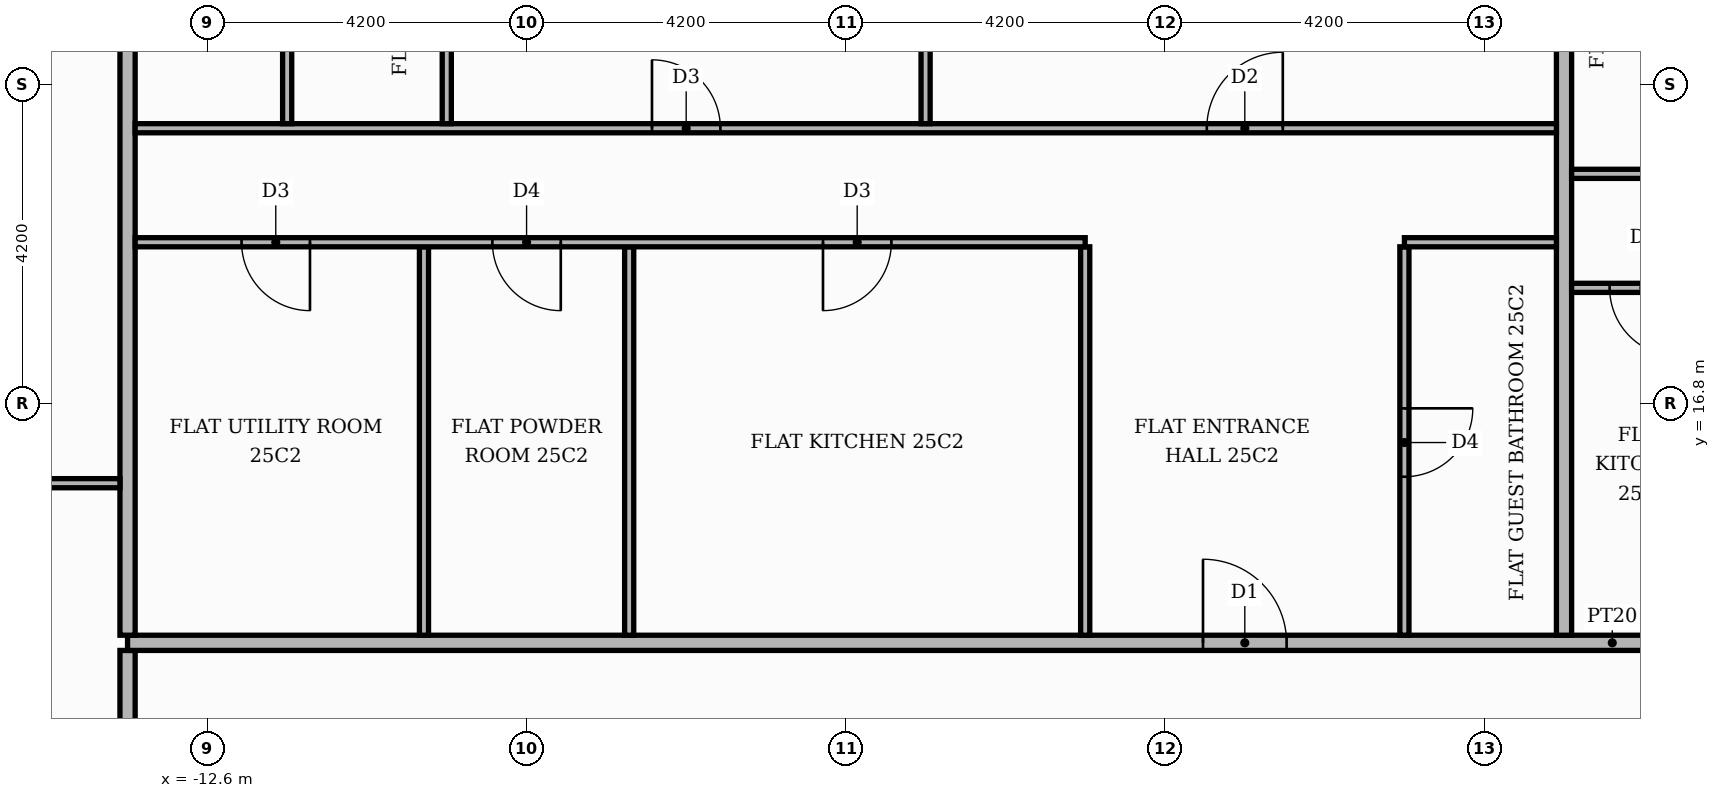
"""IFC4 building model, lengths in metres.
Left out: names, types, materials, properties, quantities, classifications, styles, units other than length and angle.
Written with IfcOpenShell. Run it as: python <this file> out.ifc"""

import sys

from ifc_helpers import new_model, si_unit, direction, frame, frame_2d, origin, place, context, subcontext, project, spatial, rectangle, extrude, element, fill, save


model = new_model("IFC4")
c1 = context("Model", 3, precision=1e-05, world=origin(), true_north=direction((0.0, 1.0)))
c2 = subcontext(c1, "Body", "Model", "MODEL_VIEW")
j1 = project(units=[si_unit("LENGTHUNIT", "METRE"), si_unit("PLANEANGLEUNIT", "RADIAN")], contexts=[c1])
p1 = place(None, origin())
s1 = spatial("IfcSite", under=j1, at=p1, CompositionType="ELEMENT")
p2 = place(p1, origin())
s2 = spatial("IfcBuilding", under=s1, at=p2, CompositionType="ELEMENT")
p3 = place(p2, frame((0.0, 0.0, 106.5)))
s3 = spatial("IfcBuildingStorey", under=s2, at=p3, CompositionType="ELEMENT", Elevation=106.5)
p4 = place(p3, frame((-13.65, -13.55, 0.0), z_axis=(0.0, 0.0, 1.0), x_axis=(0.0, 1.0, 0.0)))
e1 = element("IfcWall", 1, at=p4, inside=s3, PredefinedType="PARTITIONING", context=c2, shape_type="SweptSolid", body=[
    extrude(rectangle(XDim=27.1, YDim=0.2, at=frame_2d((13.55, 0.0))), origin(), (0.0, 0.0, 1.0), 3.48),
])
p5 = place(p4, frame((24.55, 0.0, 0.0)))
e2 = element("IfcOpeningElement", 2, at=p5, cuts=e1, PredefinedType="OPENING", context=c2, shape_type="SweptSolid", body=[
    extrude(rectangle(XDim=1.1, YDim=2.4, at=frame_2d((0.55, 1.2))), frame((0.0, 0.11, 0.0), z_axis=(0.0, -1.0, 0.0), x_axis=(1.0, 0.0, 0.0)), (0.0, 0.0, 1.0), 0.22),
])
p6 = place(p3, frame((-13.65, 13.65, 0.0), z_axis=(0.0, 0.0, 1.0), x_axis=(1.0, 0.0, 0.0)))
e3 = element("IfcWall", 3, at=p6, inside=s3, PredefinedType="PARTITIONING", context=c2, shape_type="SweptSolid", body=[
    extrude(rectangle(XDim=39.07, YDim=0.2, at=frame_2d((19.535, 0.0))), origin(), (0.0, 0.0, 1.0), 3.48),
])
p7 = place(p6, frame((24.65, 0.0, 0.0)))
e4 = element("IfcOpeningElement", 4, at=p7, cuts=e3, PredefinedType="OPENING", context=c2, shape_type="SweptSolid", body=[
    extrude(rectangle(XDim=1.1, YDim=2.4, at=frame_2d((0.55, 1.2))), frame((0.0, 0.11, 0.0), z_axis=(0.0, -1.0, 0.0), x_axis=(1.0, 0.0, 0.0)), (0.0, 0.0, 1.0), 0.22),
])
p8 = place(p6, frame((14.15, 0.0, 0.0)))
e5 = element("IfcOpeningElement", 5, at=p8, cuts=e3, PredefinedType="OPENING", context=c2, shape_type="SweptSolid", body=[
    extrude(rectangle(XDim=1.1, YDim=2.4, at=frame_2d((0.55, 1.2))), frame((0.0, 0.11, 0.0), z_axis=(0.0, -1.0, 0.0), x_axis=(1.0, 0.0, 0.0)), (0.0, 0.0, 1.0), 0.22),
])
p9 = place(p3, frame((-13.65, 13.75, 0.0), z_axis=(0.0, 0.0, 1.0), x_axis=(0.0, 1.0, 0.0)))
e6 = element("IfcWall", 6, at=p9, inside=s3, PredefinedType="PARTITIONING", context=c2, shape_type="SweptSolid", body=[
    extrude(rectangle(XDim=11.67, YDim=0.2, at=frame_2d((5.835, 0.0))), origin(), (0.0, 0.0, 1.0), 3.48),
])
for number, where, z_axis, x_axis in (
    (7, (-9.75, 13.75, 0.0), (0.0, 0.0, 1.0), (0.0, 1.0, 0.0)),
    (8, (-7.05, 13.75, 0.0), (0.0, 0.0, 1.0), (0.0, 1.0, 0.0)),
    (9, (-1.05, 13.75, 0.0), (0.0, 0.0, 1.0), (0.0, 1.0, 0.0)),
):
    element("IfcWall", number, at=place(p3, frame(where, z_axis=z_axis, x_axis=x_axis)), inside=s3, PredefinedType="PARTITIONING", context=c2, shape_type="SweptSolid", body=[
        extrude(rectangle(XDim=5.11, YDim=0.12, at=frame_2d((2.555, 0.0))), origin(), (0.0, 0.0, 1.0), 3.48),
    ])
p10 = place(p3, frame((3.15, 13.75, 0.0), z_axis=(0.0, 0.0, 1.0), x_axis=(0.0, 1.0, 0.0)))
e10 = element("IfcWall", 10, at=p10, inside=s3, PredefinedType="PARTITIONING", context=c2, shape_type="SweptSolid", body=[
    extrude(rectangle(XDim=5.11, YDim=0.12, at=frame_2d((2.555, 0.0))), origin(), (0.0, 0.0, 1.0), 3.48),
])
p11 = place(p10, frame((2.085, 0.0, 0.0)))
e11 = element("IfcOpeningElement", 11, at=p11, cuts=e10, PredefinedType="OPENING", context=c2, shape_type="SweptSolid", body=[
    extrude(rectangle(XDim=0.9, YDim=2.1, at=frame_2d((0.45, 1.05))), frame((0.0, 0.07, 0.0), z_axis=(0.0, -1.0, 0.0), x_axis=(1.0, 0.0, 0.0)), (0.0, 0.0, 1.0), 0.14),
])
p12 = place(p3, frame((5.25, 13.75, 0.0), z_axis=(0.0, 0.0, 1.0), x_axis=(0.0, 1.0, 0.0)))
e12 = element("IfcWall", 12, at=p12, inside=s3, PredefinedType="PARTITIONING", context=c2, shape_type="SweptSolid", body=[
    extrude(rectangle(XDim=11.67, YDim=0.2, at=frame_2d((5.835, 0.0))), origin(), (0.0, 0.0, 1.0), 3.48),
])
p13 = place(p3, frame((-20.72, 15.75, 0.0), z_axis=(0.0, 0.0, 1.0), x_axis=(1.0, 0.0, 0.0)))
e13 = element("IfcWall", 13, at=p13, inside=s3, PredefinedType="PARTITIONING", context=c2, shape_type="SweptSolid", body=[
    extrude(rectangle(XDim=6.97, YDim=0.12, at=frame_2d((3.485, 0.0))), origin(), (0.0, 0.0, 1.0), 3.48),
])
p14 = place(p13, frame((3.085, 0.0, 0.0)))
e14 = element("IfcOpeningElement", 14, at=p14, cuts=e13, PredefinedType="OPENING", context=c2, shape_type="SweptSolid", body=[
    extrude(rectangle(XDim=0.9, YDim=2.1, at=frame_2d((0.45, 1.05))), frame((0.0, 0.07, 0.0), z_axis=(0.0, -1.0, 0.0), x_axis=(1.0, 0.0, 0.0)), (0.0, 0.0, 1.0), 0.14),
])
p15 = place(p3, frame((5.35, 18.32, 0.0), z_axis=(0.0, 0.0, 1.0), x_axis=(1.0, 0.0, 0.0)))
e15 = element("IfcWall", 15, at=p15, inside=s3, PredefinedType="PARTITIONING", context=c2, shape_type="SweptSolid", body=[
    extrude(rectangle(XDim=4.1, YDim=0.12, at=frame_2d((2.05, 0.0))), origin(), (0.0, 0.0, 1.0), 3.48),
])
p16 = place(p15, frame((0.5, 0.0, 0.0)))
e16 = element("IfcOpeningElement", 16, at=p16, cuts=e15, PredefinedType="OPENING", context=c2, shape_type="SweptSolid", body=[
    extrude(rectangle(XDim=0.9, YDim=2.1, at=frame_2d((0.45, 1.05))), frame((0.0, 0.07, 0.0), z_axis=(0.0, -1.0, 0.0), x_axis=(1.0, 0.0, 0.0)), (0.0, 0.0, 1.0), 0.14),
])
p17 = place(p3, frame((-13.55, 18.92, 0.0), z_axis=(0.0, 0.0, 1.0), x_axis=(1.0, 0.0, 0.0)))
e17 = element("IfcWall", 17, at=p17, inside=s3, PredefinedType="PARTITIONING", context=c2, shape_type="SweptSolid", body=[
    extrude(rectangle(XDim=12.5, YDim=0.12, at=frame_2d((6.25, 0.0))), origin(), (0.0, 0.0, 1.0), 3.48),
])
p18 = place(p17, frame((9.05, 0.0, 0.0)))
e18 = element("IfcOpeningElement", 18, at=p18, cuts=e17, PredefinedType="OPENING", context=c2, shape_type="SweptSolid", body=[
    extrude(rectangle(XDim=0.9, YDim=2.1, at=frame_2d((0.45, 1.05))), frame((0.0, 0.07, 0.0), z_axis=(0.0, -1.0, 0.0), x_axis=(1.0, 0.0, 0.0)), (0.0, 0.0, 1.0), 0.14),
])
p19 = place(p17, frame((4.7, 0.0, 0.0)))
e19 = element("IfcOpeningElement", 19, at=p19, cuts=e17, PredefinedType="OPENING", context=c2, shape_type="SweptSolid", body=[
    extrude(rectangle(XDim=0.9, YDim=2.1, at=frame_2d((0.45, 1.05))), frame((0.0, 0.07, 0.0), z_axis=(0.0, -1.0, 0.0), x_axis=(1.0, 0.0, 0.0)), (0.0, 0.0, 1.0), 0.14),
])
p20 = place(p17, frame((1.4, 0.0, 0.0)))
e20 = element("IfcOpeningElement", 20, at=p20, cuts=e17, PredefinedType="OPENING", context=c2, shape_type="SweptSolid", body=[
    extrude(rectangle(XDim=0.9, YDim=2.1, at=frame_2d((0.45, 1.05))), frame((0.0, 0.07, 0.0), z_axis=(0.0, -1.0, 0.0), x_axis=(1.0, 0.0, 0.0)), (0.0, 0.0, 1.0), 0.14),
])
p21 = place(p3, frame((3.15, 18.92, 0.0), z_axis=(0.0, 0.0, 1.0), x_axis=(1.0, 0.0, 0.0)))
e21 = element("IfcWall", 21, at=p21, inside=s3, PredefinedType="PARTITIONING", context=c2, shape_type="SweptSolid", body=[
    extrude(rectangle(XDim=2.0, YDim=0.12, at=frame_2d((1.0, 0.0))), origin(), (0.0, 0.0, 1.0), 3.48),
])
p22 = place(p3, frame((5.35, 19.82, 0.0), z_axis=(0.0, 0.0, 1.0), x_axis=(1.0, 0.0, 0.0)))
e22 = element("IfcWall", 22, at=p22, inside=s3, PredefinedType="PARTITIONING", context=c2, shape_type="SweptSolid", body=[
    extrude(rectangle(XDim=12.05, YDim=0.12, at=frame_2d((6.025, 0.0))), origin(), (0.0, 0.0, 1.0), 3.48),
])
p23 = place(p22, frame((8.85, 0.0, 0.0)))
e23 = element("IfcOpeningElement", 23, at=p23, cuts=e22, PredefinedType="OPENING", context=c2, shape_type="SweptSolid", body=[
    extrude(rectangle(XDim=1.0, YDim=2.1, at=frame_2d((0.5, 1.05))), frame((0.0, 0.07, 0.0), z_axis=(0.0, -1.0, 0.0), x_axis=(1.0, 0.0, 0.0)), (0.0, 0.0, 1.0), 0.14),
])
p24 = place(p22, frame((5.75, 0.0, 0.0)))
e24 = element("IfcOpeningElement", 24, at=p24, cuts=e22, PredefinedType="OPENING", context=c2, shape_type="SweptSolid", body=[
    extrude(rectangle(XDim=0.9, YDim=2.1, at=frame_2d((0.45, 1.05))), frame((0.0, 0.07, 0.0), z_axis=(0.0, -1.0, 0.0), x_axis=(1.0, 0.0, 0.0)), (0.0, 0.0, 1.0), 0.14),
])
p25 = place(p3, frame((-13.55, 20.42, 0.0), z_axis=(0.0, 0.0, 1.0), x_axis=(1.0, 0.0, 0.0)))
e25 = element("IfcWall", 25, at=p25, inside=s3, PredefinedType="PARTITIONING", context=c2, shape_type="SweptSolid", body=[
    extrude(rectangle(XDim=18.7, YDim=0.12, at=frame_2d((9.35, 0.0))), origin(), (0.0, 0.0, 1.0), 3.48),
])
p26 = place(p25, frame((14.1, 0.0, 0.0)))
e26 = element("IfcOpeningElement", 26, at=p26, cuts=e25, PredefinedType="OPENING", context=c2, shape_type="SweptSolid", body=[
    extrude(rectangle(XDim=1.0, YDim=2.1, at=frame_2d((0.5, 1.05))), frame((0.0, 0.07, 0.0), z_axis=(0.0, -1.0, 0.0), x_axis=(1.0, 0.0, 0.0)), (0.0, 0.0, 1.0), 0.14),
])
p27 = place(p25, frame((6.8, 0.0, 0.0)))
e27 = element("IfcOpeningElement", 27, at=p27, cuts=e25, PredefinedType="OPENING", context=c2, shape_type="SweptSolid", body=[
    extrude(rectangle(XDim=0.9, YDim=2.1, at=frame_2d((0.45, 1.05))), frame((0.0, 0.07, 0.0), z_axis=(0.0, -1.0, 0.0), x_axis=(1.0, 0.0, 0.0)), (0.0, 0.0, 1.0), 0.14),
])
p28 = place(p3, frame((-11.55, 20.48, 0.0), z_axis=(0.0, 0.0, 1.0), x_axis=(0.0, 1.0, 0.0)))
e28 = element("IfcWall", 28, at=p28, inside=s3, PredefinedType="PARTITIONING", context=c2, shape_type="SweptSolid", body=[
    extrude(rectangle(XDim=4.94, YDim=0.12, at=frame_2d((2.47, 0.0))), origin(), (0.0, 0.0, 1.0), 3.48),
])
p29 = place(p28, frame((2.14, 0.0, 0.0)))
e29 = element("IfcOpeningElement", 29, at=p29, cuts=e28, PredefinedType="OPENING", context=c2, shape_type="SweptSolid", body=[
    extrude(rectangle(XDim=0.9, YDim=2.1, at=frame_2d((0.45, 1.05))), frame((0.0, 0.07, 0.0), z_axis=(0.0, -1.0, 0.0), x_axis=(1.0, 0.0, 0.0)), (0.0, 0.0, 1.0), 0.14),
])
p30 = place(p3, frame((-9.45, 20.48, 0.0), z_axis=(0.0, 0.0, 1.0), x_axis=(0.0, 1.0, 0.0)))
e30 = element("IfcWall", 30, at=p30, inside=s3, PredefinedType="PARTITIONING", context=c2, shape_type="SweptSolid", body=[
    extrude(rectangle(XDim=4.94, YDim=0.12, at=frame_2d((2.47, 0.0))), origin(), (0.0, 0.0, 1.0), 3.48),
])
p31 = place(p30, frame((2.14, 0.0, 0.0)))
e31 = element("IfcOpeningElement", 31, at=p31, cuts=e30, PredefinedType="OPENING", context=c2, shape_type="SweptSolid", body=[
    extrude(rectangle(XDim=0.9, YDim=2.1, at=frame_2d((0.45, 1.05))), frame((0.0, 0.07, 0.0), z_axis=(0.0, -1.0, 0.0), x_axis=(1.0, 0.0, 0.0)), (0.0, 0.0, 1.0), 0.14),
])
p32 = place(p3, frame((-3.15, 20.48, 0.0), z_axis=(0.0, 0.0, 1.0), x_axis=(0.0, 1.0, 0.0)))
e32 = element("IfcWall", 32, at=p32, inside=s3, PredefinedType="PARTITIONING", context=c2, shape_type="SweptSolid", body=[
    extrude(rectangle(XDim=4.94, YDim=0.12, at=frame_2d((2.47, 0.0))), origin(), (0.0, 0.0, 1.0), 3.48),
])
p33 = place(p16, frame((0.9, 0.0, 0.0), z_axis=(0.0, 0.0, 1.0), x_axis=(-1.0, 0.0, 0.0)))
e33 = element("IfcDoor", 33, at=p33, inside=s3, OperationType="SINGLE_SWING_RIGHT", PredefinedType="DOOR", context=c2, shape_type="SweptSolid", body=[
    extrude(rectangle(XDim=0.9, YDim=2.1, at=frame_2d((0.45, 1.05))), frame((0.0, 0.025, 0.0), z_axis=(0.0, -1.0, 0.0), x_axis=(1.0, 0.0, 0.0)), (0.0, 0.0, 1.0), 0.05),
])
fill(e16, e33)
p34 = place(p8, origin())
e34 = element("IfcDoor", 34, at=p34, inside=s3, OperationType="SINGLE_SWING_LEFT", PredefinedType="DOOR", context=c2, shape_type="SweptSolid", body=[
    extrude(rectangle(XDim=1.1, YDim=2.4, at=frame_2d((0.55, 1.2))), frame((0.0, 0.025, 0.0), z_axis=(0.0, -1.0, 0.0), x_axis=(1.0, 0.0, 0.0)), (0.0, 0.0, 1.0), 0.05),
])
fill(e5, e34)
p35 = place(p11, frame((0.9, 0.0, 0.0), z_axis=(0.0, 0.0, 1.0), x_axis=(-1.0, 0.0, 0.0)))
e35 = element("IfcDoor", 35, at=p35, inside=s3, OperationType="SINGLE_SWING_RIGHT", PredefinedType="DOOR", context=c2, shape_type="SweptSolid", body=[
    extrude(rectangle(XDim=0.9, YDim=2.1, at=frame_2d((0.45, 1.05))), frame((0.0, 0.025, 0.0), z_axis=(0.0, -1.0, 0.0), x_axis=(1.0, 0.0, 0.0)), (0.0, 0.0, 1.0), 0.05),
])
fill(e11, e35)
p36 = place(p18, frame((0.9, 0.0, 0.0), z_axis=(0.0, 0.0, 1.0), x_axis=(-1.0, 0.0, 0.0)))
e36 = element("IfcDoor", 36, at=p36, inside=s3, OperationType="SINGLE_SWING_LEFT", PredefinedType="DOOR", context=c2, shape_type="SweptSolid", body=[
    extrude(rectangle(XDim=0.9, YDim=2.1, at=frame_2d((0.45, 1.05))), frame((0.0, 0.025, 0.0), z_axis=(0.0, -1.0, 0.0), x_axis=(1.0, 0.0, 0.0)), (0.0, 0.0, 1.0), 0.05),
])
fill(e18, e36)
p37 = place(p19, frame((0.9, 0.0, 0.0), z_axis=(0.0, 0.0, 1.0), x_axis=(-1.0, 0.0, 0.0)))
e37 = element("IfcDoor", 37, at=p37, inside=s3, OperationType="SINGLE_SWING_RIGHT", PredefinedType="DOOR", context=c2, shape_type="SweptSolid", body=[
    extrude(rectangle(XDim=0.9, YDim=2.1, at=frame_2d((0.45, 1.05))), frame((0.0, 0.025, 0.0), z_axis=(0.0, -1.0, 0.0), x_axis=(1.0, 0.0, 0.0)), (0.0, 0.0, 1.0), 0.05),
])
fill(e19, e37)
p38 = place(p20, frame((0.9, 0.0, 0.0), z_axis=(0.0, 0.0, 1.0), x_axis=(-1.0, 0.0, 0.0)))
e38 = element("IfcDoor", 38, at=p38, inside=s3, OperationType="SINGLE_SWING_RIGHT", PredefinedType="DOOR", context=c2, shape_type="SweptSolid", body=[
    extrude(rectangle(XDim=0.9, YDim=2.1, at=frame_2d((0.45, 1.05))), frame((0.0, 0.025, 0.0), z_axis=(0.0, -1.0, 0.0), x_axis=(1.0, 0.0, 0.0)), (0.0, 0.0, 1.0), 0.05),
])
fill(e20, e38)
p39 = place(p26, origin())
e39 = element("IfcDoor", 39, at=p39, inside=s3, OperationType="SINGLE_SWING_RIGHT", PredefinedType="DOOR", context=c2, shape_type="SweptSolid", body=[
    extrude(rectangle(XDim=1.0, YDim=2.1, at=frame_2d((0.5, 1.05))), frame((0.0, 0.025, 0.0), z_axis=(0.0, -1.0, 0.0), x_axis=(1.0, 0.0, 0.0)), (0.0, 0.0, 1.0), 0.05),
])
fill(e26, e39)
p40 = place(p27, origin())
e40 = element("IfcDoor", 40, at=p40, inside=s3, OperationType="SINGLE_SWING_LEFT", PredefinedType="DOOR", context=c2, shape_type="SweptSolid", body=[
    extrude(rectangle(XDim=0.9, YDim=2.1, at=frame_2d((0.45, 1.05))), frame((0.0, 0.025, 0.0), z_axis=(0.0, -1.0, 0.0), x_axis=(1.0, 0.0, 0.0)), (0.0, 0.0, 1.0), 0.05),
])
fill(e27, e40)
save(model, sys.argv[1])
